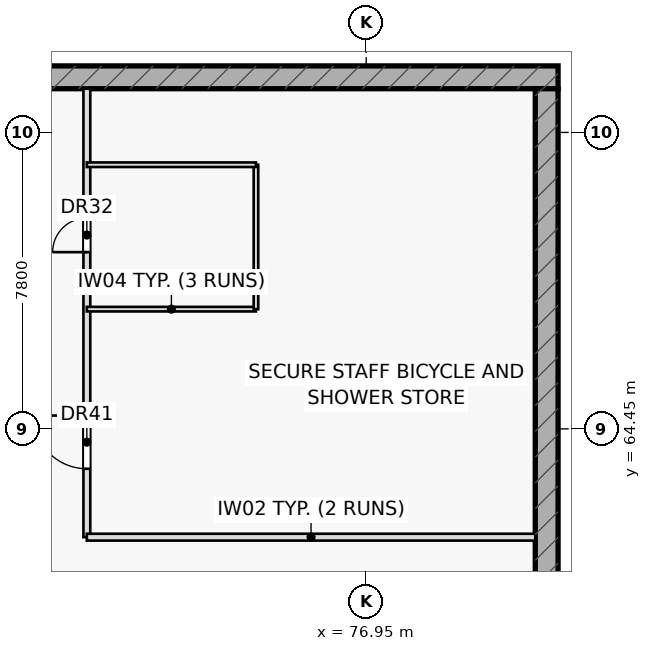
"""IFC4 building model, lengths in metres.
Left out: names, types, materials, properties, quantities, classifications, styles, units other than length and angle.
Written with IfcOpenShell. Run it as: python <this file> out.ifc"""

import sys

from ifc_helpers import new_model, si_unit, direction, frame, frame_2d, origin, place, context, subcontext, project, spatial, rectangle, extrude, element, fill, save


model = new_model("IFC4")
c1 = context("Model", 3, precision=1e-05, world=origin(), true_north=direction((0.0, 1.0)))
c2 = subcontext(c1, "Body", "Model", "MODEL_VIEW")
j1 = project(units=[si_unit("LENGTHUNIT", "METRE"), si_unit("PLANEANGLEUNIT", "RADIAN")], contexts=[c1])
p1 = place(None, origin())
s1 = spatial("IfcSite", under=j1, at=p1, CompositionType="ELEMENT")
p2 = place(p1, origin())
s2 = spatial("IfcBuilding", under=s1, at=p2, CompositionType="ELEMENT")
p3 = place(p2, frame((0.0, 0.0, -4.2)))
s3 = spatial("IfcBuildingStorey", under=s2, at=p3, CompositionType="ELEMENT", Elevation=-4.2)
p4 = place(p3, frame((18.0, 73.7, 0.0), z_axis=(0.0, 0.0, 1.0), x_axis=(1.0, 0.0, 0.0)))
e1 = element("IfcWall", 1, at=p4, inside=s3, PredefinedType="USERDEFINED", context=c2, shape_type="SweptSolid", body=[
    extrude(rectangle(XDim=64.0, YDim=0.6, at=frame_2d((32.0, 0.0))), origin(), (0.0, 0.0, 1.0), 3.85),
])
p5 = place(p3, frame((81.7, 16.6, 0.0), z_axis=(0.0, 0.0, 1.0), x_axis=(0.0, 1.0, 0.0)))
e2 = element("IfcWall", 2, at=p5, inside=s3, PredefinedType="USERDEFINED", context=c2, shape_type="SweptSolid", body=[
    extrude(rectangle(XDim=56.8, YDim=0.6, at=frame_2d((28.4, 0.0))), origin(), (0.0, 0.0, 1.0), 3.85),
])
p6 = place(p3, frame((69.6, 61.6, 0.0), z_axis=(0.0, 0.0, 1.0), x_axis=(0.0, 1.0, 0.0)))
e3 = element("IfcWall", 3, at=p6, inside=s3, PredefinedType="PARTITIONING", context=c2, shape_type="SweptSolid", body=[
    extrude(rectangle(XDim=11.8, YDim=0.18, at=frame_2d((5.9, 0.0))), origin(), (0.0, 0.0, 1.0), 3.85),
])
p7 = place(p6, frame((1.8, 0.0, 0.0)))
e4 = element("IfcOpeningElement", 4, at=p7, cuts=e3, PredefinedType="OPENING", context=c2, shape_type="SweptSolid", body=[
    extrude(rectangle(XDim=1.4, YDim=2.15, at=frame_2d((0.7, 1.075))), frame((0.0, 0.1, 0.0), z_axis=(0.0, -1.0, 0.0), x_axis=(1.0, 0.0, 0.0)), (0.0, 0.0, 1.0), 0.2),
])
p8 = place(p6, frame((7.5, 0.0, 0.0)))
e5 = element("IfcOpeningElement", 5, at=p8, cuts=e3, PredefinedType="OPENING", context=c2, shape_type="SweptSolid", body=[
    extrude(rectangle(XDim=0.9, YDim=2.05, at=frame_2d((0.45, 1.025))), frame((0.0, 0.1, 0.0), z_axis=(0.0, -1.0, 0.0), x_axis=(1.0, 0.0, 0.0)), (0.0, 0.0, 1.0), 0.2),
])
p9 = place(p3, frame((69.6, 61.6, 0.0), z_axis=(0.0, 0.0, 1.0), x_axis=(1.0, 0.0, 0.0)))
e6 = element("IfcWall", 6, at=p9, inside=s3, PredefinedType="PARTITIONING", context=c2, shape_type="SweptSolid", body=[
    extrude(rectangle(XDim=11.8, YDim=0.18, at=frame_2d((5.9, 0.0))), origin(), (0.0, 0.0, 1.0), 3.85),
])
p10 = place(p3, frame((69.6, 67.6, 0.0), z_axis=(0.0, 0.0, 1.0), x_axis=(1.0, 0.0, 0.0)))
e7 = element("IfcWall", 7, at=p10, inside=s3, PredefinedType="PARTITIONING", context=c2, shape_type="SweptSolid", body=[
    extrude(rectangle(XDim=4.45, YDim=0.12, at=frame_2d((2.225, 0.0))), origin(), (0.0, 0.0, 1.0), 3.85),
])
p11 = place(p3, frame((74.05, 67.6, 0.0), z_axis=(0.0, 0.0, 1.0), x_axis=(0.0, 1.0, 0.0)))
e8 = element("IfcWall", 8, at=p11, inside=s3, PredefinedType="PARTITIONING", context=c2, shape_type="SweptSolid", body=[
    extrude(rectangle(XDim=3.8, YDim=0.12, at=frame_2d((1.9, 0.0))), origin(), (0.0, 0.0, 1.0), 3.85),
])
p12 = place(p3, frame((69.6, 71.4, 0.0), z_axis=(0.0, 0.0, 1.0), x_axis=(1.0, 0.0, 0.0)))
e9 = element("IfcWall", 9, at=p12, inside=s3, PredefinedType="PARTITIONING", context=c2, shape_type="SweptSolid", body=[
    extrude(rectangle(XDim=4.45, YDim=0.12, at=frame_2d((2.225, 0.0))), origin(), (0.0, 0.0, 1.0), 3.85),
])
p13 = place(p7, origin())
e10 = element("IfcDoor", 10, at=p13, inside=s3, OperationType="SINGLE_SWING_RIGHT", PredefinedType="DOOR", context=c2, shape_type="SweptSolid", body=[
    extrude(rectangle(XDim=1.4, YDim=2.15, at=frame_2d((0.7, 1.075))), frame((0.0, 0.025, 0.0), z_axis=(0.0, -1.0, 0.0), x_axis=(1.0, 0.0, 0.0)), (0.0, 0.0, 1.0), 0.05),
])
fill(e4, e10)
p14 = place(p8, origin())
e11 = element("IfcDoor", 11, at=p14, inside=s3, OperationType="SINGLE_SWING_LEFT", PredefinedType="DOOR", context=c2, shape_type="SweptSolid", body=[
    extrude(rectangle(XDim=0.9, YDim=2.05, at=frame_2d((0.45, 1.025))), frame((0.0, 0.025, 0.0), z_axis=(0.0, -1.0, 0.0), x_axis=(1.0, 0.0, 0.0)), (0.0, 0.0, 1.0), 0.05),
])
fill(e5, e11)
save(model, sys.argv[1])
